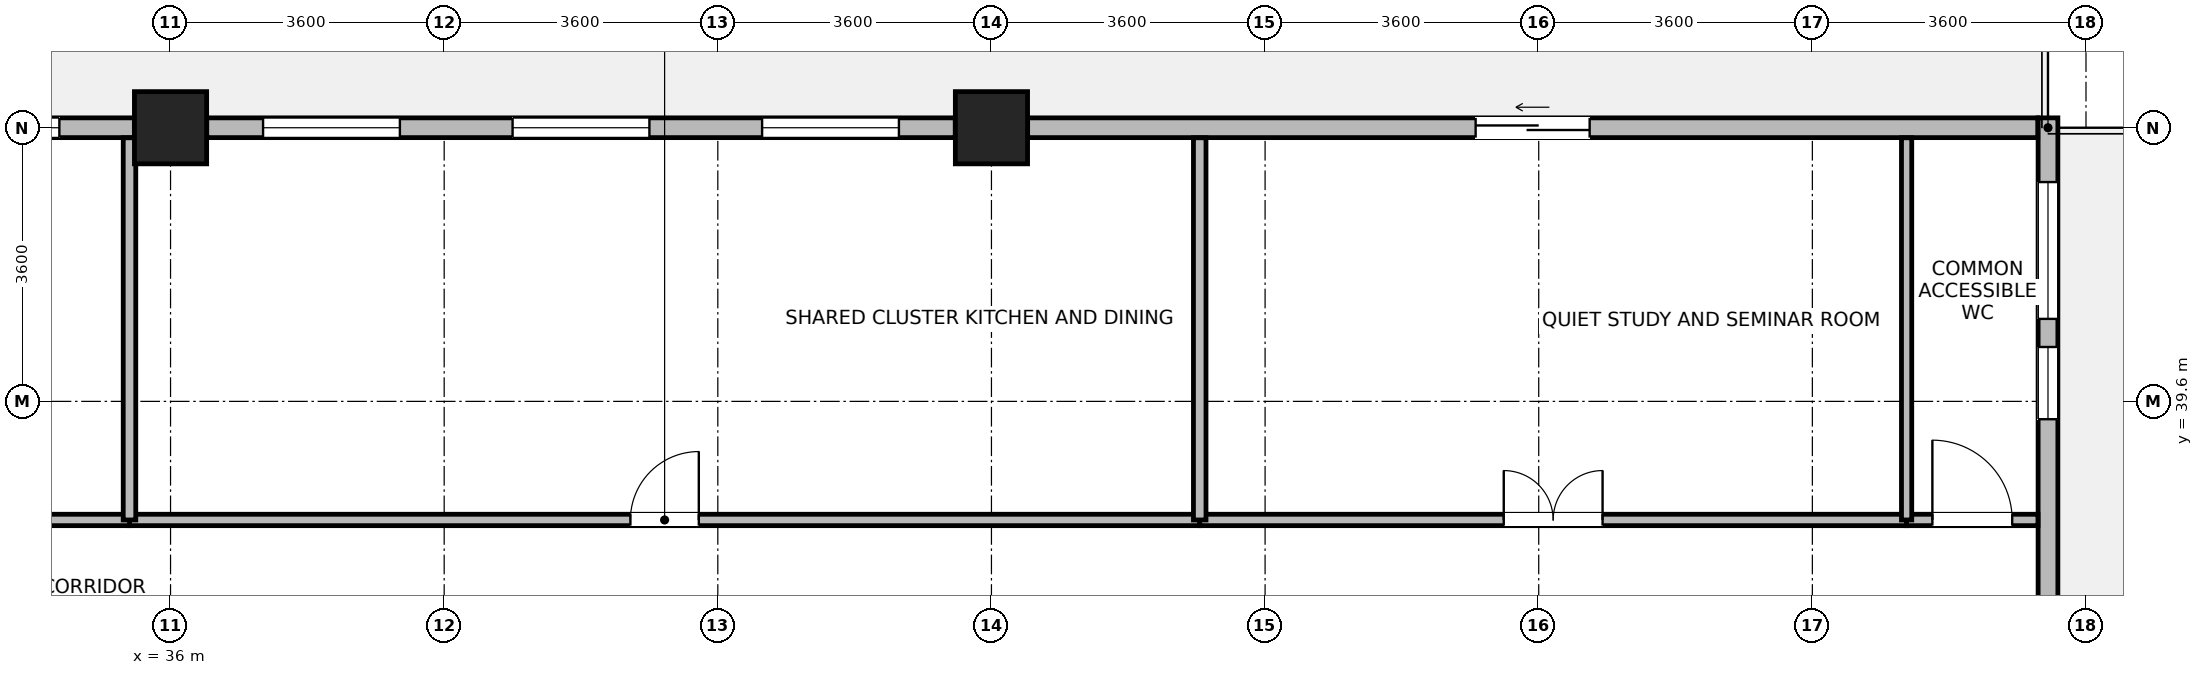
"""IFC4 building model, lengths in metres.
Left out: names, types, materials, properties, quantities, classifications, styles, units other than length and angle.
Written with IfcOpenShell. Run it as: python <this file> out.ifc"""

import sys

from ifc_helpers import new_model, si_unit, direction, frame, frame_2d, origin, origin_2d, place, context, subcontext, project, spatial, rectangle, extrude, source, transform, mapped, element, fill, save


model = new_model("IFC4")
c1 = context("Model", 3, precision=1e-05, world=origin(), true_north=direction((0.0, 1.0)))
c2 = subcontext(c1, "Body", "Model", "MODEL_VIEW")
j1 = project(units=[si_unit("LENGTHUNIT", "METRE"), si_unit("PLANEANGLEUNIT", "RADIAN")], contexts=[c1])
p1 = place(None, origin())
s1 = spatial("IfcSite", under=j1, at=p1, CompositionType="ELEMENT")
p2 = place(p1, origin())
s2 = spatial("IfcBuilding", under=s1, at=p2, CompositionType="ELEMENT")
p3 = place(p2, frame((0.0, 0.0, 209.2)))
s3 = spatial("IfcBuildingStorey", under=s2, at=p3, CompositionType="ELEMENT", Elevation=209.2)
m1 = source(origin(), c2, "Body", "SweptSolid", [
    extrude(rectangle(XDim=0.95, YDim=0.95, at=origin_2d()), origin(), (0.0, 0.0, 1.0), 3.7),
])
for number, where, z_axis, x_axis in (
    (1, (36.0, 43.2, 0.0), (0.0, 0.0, 1.0), (1.0, 0.0, 0.0)),
    (2, (46.8, 43.2, 0.0), (0.0, 0.0, 1.0), (1.0, 0.0, 0.0)),
):
    element("IfcColumn", number, at=place(p3, frame(where, z_axis=z_axis, x_axis=x_axis)), inside=s3, PredefinedType="COLUMN", context=c2, shape_type="MappedRepresentation", body=[
        mapped(m1, transform((0.0, 0.0, 0.0), x_axis=(1.0, 0.0, 0.0), y_axis=(0.0, 1.0, 0.0), z_axis=(0.0, 0.0, 1.0), scale=1.0)),
    ])
p4 = place(p3, frame((60.7, 43.33, 0.0), z_axis=(0.0, 0.0, 1.0), x_axis=(0.0, -1.0, 0.0)))
e3 = element("IfcWall", 3, at=p4, inside=s3, PredefinedType="STANDARD", context=c2, shape_type="SweptSolid", body=[
    extrude(rectangle(XDim=6.979, YDim=0.26, at=frame_2d((3.49, 0.0))), origin(), (0.0, 0.0, 1.0), 3.45),
])
p5 = place(p4, frame((0.845, 0.0, 0.85)))
e4 = element("IfcOpeningElement", 4, at=p5, cuts=e3, PredefinedType="OPENING", context=c2, shape_type="SweptSolid", body=[
    extrude(rectangle(XDim=1.8, YDim=1.85, at=frame_2d((0.9, 0.925))), frame((0.0, 0.14, 0.0), z_axis=(0.0, -1.0, 0.0), x_axis=(1.0, 0.0, 0.0)), (0.0, 0.0, 1.0), 0.28),
])
p6 = place(p4, frame((3.014, 0.0, 0.85)))
e5 = element("IfcOpeningElement", 5, at=p6, cuts=e3, PredefinedType="OPENING", context=c2, shape_type="SweptSolid", body=[
    extrude(rectangle(XDim=0.95, YDim=1.75, at=frame_2d((0.475, 0.875))), frame((0.0, 0.14, 0.0), z_axis=(0.0, -1.0, 0.0), x_axis=(1.0, 0.0, 0.0)), (0.0, 0.0, 1.0), 0.28),
])
p7 = place(p3, frame((47.276, 43.2, 0.0), z_axis=(0.0, 0.0, 1.0), x_axis=(1.0, 0.0, 0.0)))
e6 = element("IfcWall", 6, at=p7, inside=s3, PredefinedType="STANDARD", context=c2, shape_type="SweptSolid", body=[
    extrude(rectangle(XDim=13.289, YDim=0.26, at=frame_2d((6.645, 0.0))), origin(), (0.0, 0.0, 1.0), 3.45),
])
p8 = place(p7, frame((5.894, 0.0, 0.0)))
e7 = element("IfcOpeningElement", 7, at=p8, cuts=e6, PredefinedType="OPENING", context=c2, shape_type="SweptSolid", body=[
    extrude(rectangle(XDim=1.5, YDim=2.15, at=frame_2d((0.75, 1.075))), frame((0.0, 0.14, 0.0), z_axis=(0.0, -1.0, 0.0), x_axis=(1.0, 0.0, 0.0)), (0.0, 0.0, 1.0), 0.28),
])
p9 = place(p3, frame((36.476, 43.2, 0.0), z_axis=(0.0, 0.0, 1.0), x_axis=(1.0, 0.0, 0.0)))
e8 = element("IfcWall", 8, at=p9, inside=s3, PredefinedType="STANDARD", context=c2, shape_type="SweptSolid", body=[
    extrude(rectangle(XDim=9.848, YDim=0.26, at=frame_2d((4.924, 0.0))), origin(), (0.0, 0.0, 1.0), 3.0),
])
p10 = place(p9, frame((0.741, 0.0, 0.85)))
e9 = element("IfcOpeningElement", 9, at=p10, cuts=e8, PredefinedType="OPENING", context=c2, shape_type="SweptSolid", body=[
    extrude(rectangle(XDim=1.8, YDim=1.85, at=frame_2d((0.9, 0.925))), frame((0.0, 0.14, 0.0), z_axis=(0.0, -1.0, 0.0), x_axis=(1.0, 0.0, 0.0)), (0.0, 0.0, 1.0), 0.28),
])
p11 = place(p9, frame((4.024, 0.0, 0.85)))
e10 = element("IfcOpeningElement", 10, at=p11, cuts=e8, PredefinedType="OPENING", context=c2, shape_type="SweptSolid", body=[
    extrude(rectangle(XDim=1.8, YDim=1.85, at=frame_2d((0.9, 0.925))), frame((0.0, 0.14, 0.0), z_axis=(0.0, -1.0, 0.0), x_axis=(1.0, 0.0, 0.0)), (0.0, 0.0, 1.0), 0.28),
])
p12 = place(p9, frame((7.307, 0.0, 0.85)))
e11 = element("IfcOpeningElement", 11, at=p12, cuts=e8, PredefinedType="OPENING", context=c2, shape_type="SweptSolid", body=[
    extrude(rectangle(XDim=1.8, YDim=1.85, at=frame_2d((0.9, 0.925))), frame((0.0, 0.14, 0.0), z_axis=(0.0, -1.0, 0.0), x_axis=(1.0, 0.0, 0.0)), (0.0, 0.0, 1.0), 0.28),
])
p13 = place(p3, frame((32.601, 43.2, 0.0), z_axis=(0.0, 0.0, 1.0), x_axis=(1.0, 0.0, 0.0)))
e12 = element("IfcWall", 12, at=p13, inside=s3, PredefinedType="STANDARD", context=c2, shape_type="SweptSolid", body=[
    extrude(rectangle(XDim=2.923, YDim=0.26, at=frame_2d((1.462, 0.0))), origin(), (0.0, 0.0, 1.0), 3.0),
])
p14 = place(p13, frame((0.987, 0.0, 0.85)))
e13 = element("IfcOpeningElement", 13, at=p14, cuts=e12, PredefinedType="OPENING", context=c2, shape_type="SweptSolid", body=[
    extrude(rectangle(XDim=0.95, YDim=1.75, at=frame_2d((0.475, 0.875))), frame((0.0, 0.14, 0.0), z_axis=(0.0, -1.0, 0.0), x_axis=(1.0, 0.0, 0.0)), (0.0, 0.0, 1.0), 0.28),
])
p15 = place(p3, frame((35.46, 38.04, 0.0), z_axis=(0.0, 0.0, 1.0), x_axis=(1.0, 0.0, 0.0)))
e14 = element("IfcWall", 14, at=p15, inside=s3, PredefinedType="PARTITIONING", context=c2, shape_type="SweptSolid", body=[
    extrude(rectangle(XDim=14.08, YDim=0.15, at=frame_2d((7.04, 0.0))), origin(), (0.0, 0.0, 1.0), 3.45),
])
p16 = place(p15, frame((6.59, 0.0, 0.0)))
e15 = element("IfcOpeningElement", 15, at=p16, cuts=e14, PredefinedType="OPENING", context=c2, shape_type="SweptSolid", body=[
    extrude(rectangle(XDim=0.9, YDim=2.08, at=frame_2d((0.45, 1.04))), frame((0.0, 0.085, 0.0), z_axis=(0.0, -1.0, 0.0), x_axis=(1.0, 0.0, 0.0)), (0.0, 0.0, 1.0), 0.17),
])
p17 = place(p3, frame((24.56, 38.04, 0.0), z_axis=(0.0, 0.0, 1.0), x_axis=(1.0, 0.0, 0.0)))
e16 = element("IfcWall", 16, at=p17, inside=s3, PredefinedType="PARTITIONING", context=c2, shape_type="SweptSolid", body=[
    extrude(rectangle(XDim=10.9, YDim=0.15, at=frame_2d((5.45, 0.0))), origin(), (0.0, 0.0, 1.0), 3.45),
])
p18 = place(p17, frame((4.8, 0.0, 0.0)))
e17 = element("IfcOpeningElement", 17, at=p18, cuts=e16, PredefinedType="OPENING", context=c2, shape_type="SweptSolid", body=[
    extrude(rectangle(XDim=1.3, YDim=2.12, at=frame_2d((0.65, 1.06))), frame((0.0, 0.085, 0.0), z_axis=(0.0, -1.0, 0.0), x_axis=(1.0, 0.0, 0.0)), (0.0, 0.0, 1.0), 0.17),
])
p19 = place(p3, frame((49.54, 38.04, 0.0), z_axis=(0.0, 0.0, 1.0), x_axis=(1.0, 0.0, 0.0)))
e18 = element("IfcWall", 18, at=p19, inside=s3, PredefinedType="PARTITIONING", context=c2, shape_type="SweptSolid", body=[
    extrude(rectangle(XDim=9.3, YDim=0.15, at=frame_2d((4.65, 0.0))), origin(), (0.0, 0.0, 1.0), 3.45),
])
p20 = place(p19, frame((4.0, 0.0, 0.0)))
e19 = element("IfcOpeningElement", 19, at=p20, cuts=e18, PredefinedType="OPENING", context=c2, shape_type="SweptSolid", body=[
    extrude(rectangle(XDim=1.3, YDim=2.12, at=frame_2d((0.65, 1.06))), frame((0.0, 0.085, 0.0), z_axis=(0.0, -1.0, 0.0), x_axis=(1.0, 0.0, 0.0)), (0.0, 0.0, 1.0), 0.17),
])
p21 = place(p3, frame((58.84, 38.04, 0.0), z_axis=(0.0, 0.0, 1.0), x_axis=(1.0, 0.0, 0.0)))
e20 = element("IfcWall", 20, at=p21, inside=s3, PredefinedType="PARTITIONING", context=c2, shape_type="SweptSolid", body=[
    extrude(rectangle(XDim=1.728, YDim=0.15, at=frame_2d((0.864, 0.0))), origin(), (0.0, 0.0, 1.0), 3.45),
])
p22 = place(p21, frame((0.339, 0.0, 0.0)))
e21 = element("IfcOpeningElement", 21, at=p22, cuts=e20, PredefinedType="OPENING", context=c2, shape_type="SweptSolid", body=[
    extrude(rectangle(XDim=1.05, YDim=2.12, at=frame_2d((0.525, 1.06))), frame((0.0, 0.085, 0.0), z_axis=(0.0, -1.0, 0.0), x_axis=(1.0, 0.0, 0.0)), (0.0, 0.0, 1.0), 0.17),
])
for number, where, z_axis, x_axis in (
    (22, (35.46, 38.04, 0.0), (0.0, 0.0, 1.0), (0.0, 1.0, 0.0)),
    (23, (49.54, 38.04, 0.0), (0.0, 0.0, 1.0), (0.0, 1.0, 0.0)),
):
    element("IfcWall", number, at=place(p3, frame(where, z_axis=z_axis, x_axis=x_axis)), inside=s3, PredefinedType="PARTITIONING", context=c2, shape_type="SweptSolid", body=[
        extrude(rectangle(XDim=5.028, YDim=0.165, at=frame_2d((2.514, 0.0))), origin(), (0.0, 0.0, 1.0), 3.45),
    ])
p23 = place(p3, frame((58.84, 38.04, 0.0), z_axis=(0.0, 0.0, 1.0), x_axis=(0.0, 1.0, 0.0)))
e24 = element("IfcWall", 24, at=p23, inside=s3, PredefinedType="PARTITIONING", context=c2, shape_type="SweptSolid", body=[
    extrude(rectangle(XDim=5.028, YDim=0.135, at=frame_2d((2.514, 0.0))), origin(), (0.0, 0.0, 1.0), 3.45),
])
p24 = place(p5, origin())
e25 = element("IfcWindow", 25, at=p24, inside=s3, PartitioningType="SINGLE_PANEL", PredefinedType="WINDOW", context=c2, shape_type="SweptSolid", body=[
    extrude(rectangle(XDim=1.8, YDim=1.85, at=frame_2d((0.9, 0.925))), frame((0.0, 0.03, 0.0), z_axis=(0.0, -1.0, 0.0), x_axis=(1.0, 0.0, 0.0)), (0.0, 0.0, 1.0), 0.06),
])
fill(e4, e25)
p25 = place(p6, origin())
e26 = element("IfcWindow", 26, at=p25, inside=s3, PartitioningType="SINGLE_PANEL", PredefinedType="WINDOW", context=c2, shape_type="SweptSolid", body=[
    extrude(rectangle(XDim=0.95, YDim=1.75, at=frame_2d((0.475, 0.875))), frame((0.0, 0.03, 0.0), z_axis=(0.0, -1.0, 0.0), x_axis=(1.0, 0.0, 0.0)), (0.0, 0.0, 1.0), 0.06),
])
fill(e5, e26)
p26 = place(p8, origin())
e27 = element("IfcDoor", 27, at=p26, inside=s3, OperationType="SLIDING_TO_LEFT", PredefinedType="DOOR", context=c2, shape_type="SweptSolid", body=[
    extrude(rectangle(XDim=1.5, YDim=2.15, at=frame_2d((0.75, 1.075))), frame((0.0, 0.025, 0.0), z_axis=(0.0, -1.0, 0.0), x_axis=(1.0, 0.0, 0.0)), (0.0, 0.0, 1.0), 0.05),
])
fill(e7, e27)
p27 = place(p10, origin())
e28 = element("IfcWindow", 28, at=p27, inside=s3, PartitioningType="SINGLE_PANEL", PredefinedType="WINDOW", context=c2, shape_type="SweptSolid", body=[
    extrude(rectangle(XDim=1.8, YDim=1.85, at=frame_2d((0.9, 0.925))), frame((0.0, 0.03, 0.0), z_axis=(0.0, -1.0, 0.0), x_axis=(1.0, 0.0, 0.0)), (0.0, 0.0, 1.0), 0.06),
])
fill(e9, e28)
p28 = place(p11, origin())
e29 = element("IfcWindow", 29, at=p28, inside=s3, PartitioningType="SINGLE_PANEL", PredefinedType="WINDOW", context=c2, shape_type="SweptSolid", body=[
    extrude(rectangle(XDim=1.8, YDim=1.85, at=frame_2d((0.9, 0.925))), frame((0.0, 0.03, 0.0), z_axis=(0.0, -1.0, 0.0), x_axis=(1.0, 0.0, 0.0)), (0.0, 0.0, 1.0), 0.06),
])
fill(e10, e29)
p29 = place(p12, origin())
e30 = element("IfcWindow", 30, at=p29, inside=s3, PartitioningType="SINGLE_PANEL", PredefinedType="WINDOW", context=c2, shape_type="SweptSolid", body=[
    extrude(rectangle(XDim=1.8, YDim=1.85, at=frame_2d((0.9, 0.925))), frame((0.0, 0.03, 0.0), z_axis=(0.0, -1.0, 0.0), x_axis=(1.0, 0.0, 0.0)), (0.0, 0.0, 1.0), 0.06),
])
fill(e11, e30)
p30 = place(p14, origin())
e31 = element("IfcWindow", 31, at=p30, inside=s3, PartitioningType="SINGLE_PANEL", PredefinedType="WINDOW", context=c2, shape_type="SweptSolid", body=[
    extrude(rectangle(XDim=0.95, YDim=1.75, at=frame_2d((0.475, 0.875))), frame((0.0, 0.03, 0.0), z_axis=(0.0, -1.0, 0.0), x_axis=(1.0, 0.0, 0.0)), (0.0, 0.0, 1.0), 0.06),
])
fill(e13, e31)
p31 = place(p16, origin())
e32 = element("IfcDoor", 32, at=p31, inside=s3, OperationType="SINGLE_SWING_RIGHT", PredefinedType="DOOR", context=c2, shape_type="SweptSolid", body=[
    extrude(rectangle(XDim=0.9, YDim=2.08, at=frame_2d((0.45, 1.04))), frame((0.0, 0.025, 0.0), z_axis=(0.0, -1.0, 0.0), x_axis=(1.0, 0.0, 0.0)), (0.0, 0.0, 1.0), 0.05),
])
fill(e15, e32)
p32 = place(p20, origin())
e33 = element("IfcDoor", 33, at=p32, inside=s3, OperationType="DOUBLE_DOOR_SINGLE_SWING", PredefinedType="DOOR", context=c2, shape_type="SweptSolid", body=[
    extrude(rectangle(XDim=1.3, YDim=2.12, at=frame_2d((0.65, 1.06))), frame((0.0, 0.025, 0.0), z_axis=(0.0, -1.0, 0.0), x_axis=(1.0, 0.0, 0.0)), (0.0, 0.0, 1.0), 0.05),
])
fill(e19, e33)
p33 = place(p22, origin())
e34 = element("IfcDoor", 34, at=p33, inside=s3, OperationType="SINGLE_SWING_LEFT", PredefinedType="DOOR", context=c2, shape_type="SweptSolid", body=[
    extrude(rectangle(XDim=1.05, YDim=2.12, at=frame_2d((0.525, 1.06))), frame((0.0, 0.025, 0.0), z_axis=(0.0, -1.0, 0.0), x_axis=(1.0, 0.0, 0.0)), (0.0, 0.0, 1.0), 0.05),
])
fill(e21, e34)
save(model, sys.argv[1])
